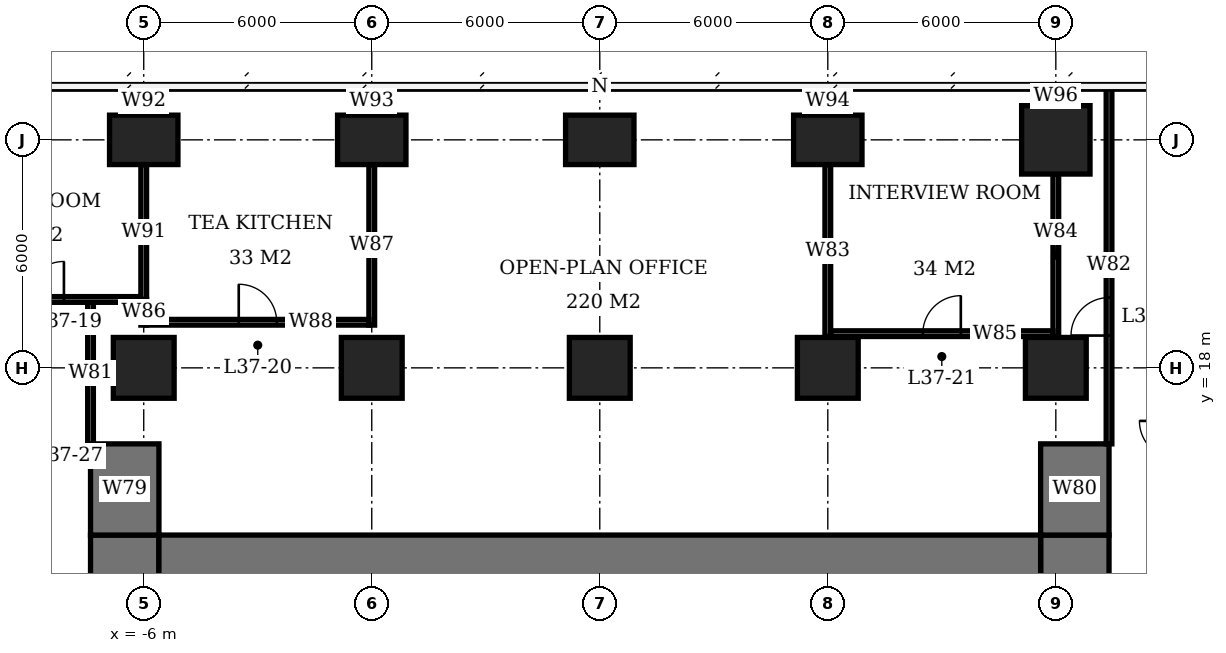
"""IFC4 building model, lengths in metres.
Left out: names, types, materials, properties, quantities, classifications, styles, units other than length and angle.
Written with IfcOpenShell. Run it as: python <this file> out.ifc"""

import sys

from ifc_helpers import new_model, si_unit, direction, frame, frame_2d, origin, origin_2d, place, context, subcontext, project, spatial, rectangle, extrude, element, fill, save


model = new_model("IFC4")
c1 = context("Model", 3, precision=1e-05, world=origin(), true_north=direction((0.0, 1.0)))
c2 = subcontext(c1, "Body", "Model", "MODEL_VIEW")
j1 = project(units=[si_unit("LENGTHUNIT", "METRE"), si_unit("PLANEANGLEUNIT", "RADIAN")], contexts=[c1])
p1 = place(None, origin())
s1 = spatial("IfcSite", under=j1, at=p1, CompositionType="ELEMENT")
p2 = place(p1, origin())
s2 = spatial("IfcBuilding", under=s1, at=p2, CompositionType="ELEMENT")
p3 = place(p2, frame((0.0, 0.0, 152.3)))
s3 = spatial("IfcBuildingStorey", under=s2, at=p3, CompositionType="ELEMENT", Elevation=152.3)
p4 = place(p3, frame((-6.0, 18.0, 0.0), z_axis=(0.0, 0.0, 1.0), x_axis=(1.0, 0.0, 0.0)))
e1 = element("IfcColumn", 1, at=p4, inside=s3, PredefinedType="COLUMN", context=c2, shape_type="SweptSolid", body=[
    extrude(rectangle(XDim=1.6, YDim=1.6, at=origin_2d()), origin(), (0.0, 0.0, 1.0), 3.9),
])
p5 = place(p3, frame((-6.0, 24.0, 0.0), z_axis=(0.0, 0.0, 1.0), x_axis=(1.0, 0.0, 0.0)))
e2 = element("IfcColumn", 2, at=p5, inside=s3, PredefinedType="COLUMN", context=c2, shape_type="SweptSolid", body=[
    extrude(rectangle(XDim=1.8, YDim=1.3, at=origin_2d()), origin(), (0.0, 0.0, 1.0), 3.9),
])
p6 = place(p3, frame((0.0, 18.0, 0.0), z_axis=(0.0, 0.0, 1.0), x_axis=(1.0, 0.0, 0.0)))
e3 = element("IfcColumn", 3, at=p6, inside=s3, PredefinedType="COLUMN", context=c2, shape_type="SweptSolid", body=[
    extrude(rectangle(XDim=1.6, YDim=1.6, at=origin_2d()), origin(), (0.0, 0.0, 1.0), 3.9),
])
p7 = place(p3, frame((0.0, 24.0, 0.0), z_axis=(0.0, 0.0, 1.0), x_axis=(1.0, 0.0, 0.0)))
e4 = element("IfcColumn", 4, at=p7, inside=s3, PredefinedType="COLUMN", context=c2, shape_type="SweptSolid", body=[
    extrude(rectangle(XDim=1.8, YDim=1.3, at=origin_2d()), origin(), (0.0, 0.0, 1.0), 3.9),
])
p8 = place(p3, frame((6.0, 18.0, 0.0), z_axis=(0.0, 0.0, 1.0), x_axis=(1.0, 0.0, 0.0)))
e5 = element("IfcColumn", 5, at=p8, inside=s3, PredefinedType="COLUMN", context=c2, shape_type="SweptSolid", body=[
    extrude(rectangle(XDim=1.6, YDim=1.6, at=origin_2d()), origin(), (0.0, 0.0, 1.0), 3.9),
])
p9 = place(p3, frame((6.0, 24.0, 0.0), z_axis=(0.0, 0.0, 1.0), x_axis=(1.0, 0.0, 0.0)))
e6 = element("IfcColumn", 6, at=p9, inside=s3, PredefinedType="COLUMN", context=c2, shape_type="SweptSolid", body=[
    extrude(rectangle(XDim=1.8, YDim=1.3, at=origin_2d()), origin(), (0.0, 0.0, 1.0), 3.9),
])
p10 = place(p3, frame((12.0, 18.0, 0.0), z_axis=(0.0, 0.0, 1.0), x_axis=(1.0, 0.0, 0.0)))
e7 = element("IfcColumn", 7, at=p10, inside=s3, PredefinedType="COLUMN", context=c2, shape_type="SweptSolid", body=[
    extrude(rectangle(XDim=1.6, YDim=1.6, at=origin_2d()), origin(), (0.0, 0.0, 1.0), 3.9),
])
p11 = place(p3, frame((12.0, 24.0, 0.0), z_axis=(0.0, 0.0, 1.0), x_axis=(1.0, 0.0, 0.0)))
e8 = element("IfcColumn", 8, at=p11, inside=s3, PredefinedType="COLUMN", context=c2, shape_type="SweptSolid", body=[
    extrude(rectangle(XDim=1.8, YDim=1.3, at=origin_2d()), origin(), (0.0, 0.0, 1.0), 3.9),
])
p12 = place(p3, frame((18.0, 18.0, 0.0), z_axis=(0.0, 0.0, 1.0), x_axis=(1.0, 0.0, 0.0)))
e9 = element("IfcColumn", 9, at=p12, inside=s3, PredefinedType="COLUMN", context=c2, shape_type="SweptSolid", body=[
    extrude(rectangle(XDim=1.6, YDim=1.6, at=origin_2d()), origin(), (0.0, 0.0, 1.0), 3.9),
])
p13 = place(p3, frame((18.0, 24.0, 0.0), z_axis=(0.0, 0.0, 1.0), x_axis=(1.0, 0.0, 0.0)))
e10 = element("IfcColumn", 10, at=p13, inside=s3, PredefinedType="COLUMN", context=c2, shape_type="SweptSolid", body=[
    extrude(rectangle(XDim=1.8, YDim=1.8, at=origin_2d()), origin(), (0.0, 0.0, 1.0), 3.9),
])
p14 = place(p3, frame((-5.6, 12.6, 0.0), z_axis=(0.0, 0.0, 1.0), x_axis=(1.0, 0.0, 0.0)))
e11 = element("IfcWall", 11, at=p14, inside=s3, PredefinedType="SHEAR", context=c2, shape_type="SweptSolid", body=[
    extrude(rectangle(XDim=23.2, YDim=2.0, at=frame_2d((11.6, 0.0))), origin(), (0.0, 0.0, 1.0), 3.9),
])
p15 = place(p3, frame((-6.5, -7.6, 0.0), z_axis=(0.0, 0.0, 1.0), x_axis=(0.0, 1.0, 0.0)))
e12 = element("IfcWall", 12, at=p15, inside=s3, PredefinedType="SHEAR", context=c2, shape_type="SweptSolid", body=[
    extrude(rectangle(XDim=21.2, YDim=1.8, at=frame_2d((10.6, 0.0))), origin(), (0.0, 0.0, 1.0), 3.9),
])
p16 = place(p15, frame((7.8, 0.0, 0.0)))
e13 = element("IfcOpeningElement", 13, at=p16, cuts=e12, PredefinedType="OPENING", context=c2, shape_type="SweptSolid", body=[
    extrude(rectangle(XDim=1.8, YDim=2.4, at=frame_2d((0.9, 1.2))), frame((0.0, 0.91, 0.0), z_axis=(0.0, -1.0, 0.0), x_axis=(1.0, 0.0, 0.0)), (0.0, 0.0, 1.0), 1.82),
])
p17 = place(p3, frame((18.5, -7.6, 0.0), z_axis=(0.0, 0.0, 1.0), x_axis=(0.0, 1.0, 0.0)))
e14 = element("IfcWall", 14, at=p17, inside=s3, PredefinedType="SHEAR", context=c2, shape_type="SweptSolid", body=[
    extrude(rectangle(XDim=21.2, YDim=1.8, at=frame_2d((10.6, 0.0))), origin(), (0.0, 0.0, 1.0), 3.9),
])
p18 = place(p17, frame((9.2, 0.0, 0.0)))
e15 = element("IfcOpeningElement", 15, at=p18, cuts=e14, PredefinedType="OPENING", context=c2, shape_type="SweptSolid", body=[
    extrude(rectangle(XDim=1.8, YDim=2.4, at=frame_2d((0.9, 1.2))), frame((0.0, 0.91, 0.0), z_axis=(0.0, -1.0, 0.0), x_axis=(1.0, 0.0, 0.0)), (0.0, 0.0, 1.0), 1.82),
])
for number, where, z_axis, x_axis in (
    (16, (-6.5, 13.6, 0.0), (0.0, 0.0, 1.0), (0.0, 1.0, 0.0)),
    (17, (18.5, 13.6, 0.0), (0.0, 0.0, 1.0), (0.0, 1.0, 0.0)),
):
    element("IfcWall", number, at=place(p3, frame(where, z_axis=z_axis, x_axis=x_axis)), inside=s3, PredefinedType="SHEAR", context=c2, shape_type="SweptSolid", body=[
        extrude(rectangle(XDim=2.4, YDim=1.8, at=frame_2d((1.2, 0.0))), origin(), (0.0, 0.0, 1.0), 3.9),
    ])
p19 = place(p3, frame((12.075, 18.9, 0.0), z_axis=(0.0, 0.0, 1.0), x_axis=(1.0, 0.0, 0.0)))
e18 = element("IfcWall", 18, at=p19, inside=s3, PredefinedType="PARTITIONING", context=c2, shape_type="SweptSolid", body=[
    extrude(rectangle(XDim=5.85, YDim=0.15, at=frame_2d((2.925, 0.0))), origin(), (0.0, 0.0, 1.0), 3.65),
])
p20 = place(p19, frame((2.425, 0.0, 0.0)))
e19 = element("IfcOpeningElement", 19, at=p20, cuts=e18, PredefinedType="OPENING", context=c2, shape_type="SweptSolid", body=[
    extrude(rectangle(XDim=1.0, YDim=2.1, at=frame_2d((0.5, 1.05))), frame((0.0, 0.085, 0.0), z_axis=(0.0, -1.0, 0.0), x_axis=(1.0, 0.0, 0.0)), (0.0, 0.0, 1.0), 0.17),
])
p21 = place(p3, frame((-5.925, 19.2, 0.0), z_axis=(0.0, 0.0, 1.0), x_axis=(1.0, 0.0, 0.0)))
e20 = element("IfcWall", 20, at=p21, inside=s3, PredefinedType="PARTITIONING", context=c2, shape_type="SweptSolid", body=[
    extrude(rectangle(XDim=5.85, YDim=0.15, at=frame_2d((2.925, 0.0))), origin(), (0.0, 0.0, 1.0), 3.65),
])
p22 = place(p21, frame((2.425, 0.0, 0.0)))
e21 = element("IfcOpeningElement", 21, at=p22, cuts=e20, PredefinedType="OPENING", context=c2, shape_type="SweptSolid", body=[
    extrude(rectangle(XDim=1.0, YDim=2.1, at=frame_2d((0.5, 1.05))), frame((0.0, 0.085, 0.0), z_axis=(0.0, -1.0, 0.0), x_axis=(1.0, 0.0, 0.0)), (0.0, 0.0, 1.0), 0.17),
])
p23 = place(p3, frame((-11.925, 19.8, 0.0), z_axis=(0.0, 0.0, 1.0), x_axis=(1.0, 0.0, 0.0)))
e22 = element("IfcWall", 22, at=p23, inside=s3, PredefinedType="PARTITIONING", context=c2, shape_type="SweptSolid", body=[
    extrude(rectangle(XDim=5.85, YDim=0.15, at=frame_2d((2.925, 0.0))), origin(), (0.0, 0.0, 1.0), 3.65),
])
p24 = place(p23, frame((2.825, 0.0, 0.0)))
e23 = element("IfcOpeningElement", 23, at=p24, cuts=e22, PredefinedType="OPENING", context=c2, shape_type="SweptSolid", body=[
    extrude(rectangle(XDim=1.0, YDim=2.1, at=frame_2d((0.5, 1.05))), frame((0.0, 0.085, 0.0), z_axis=(0.0, -1.0, 0.0), x_axis=(1.0, 0.0, 0.0)), (0.0, 0.0, 1.0), 0.17),
])
p25 = place(p3, frame((-6.0, 19.125, 0.0), z_axis=(0.0, 0.0, 1.0), x_axis=(0.0, 1.0, 0.0)))
e24 = element("IfcWall", 24, at=p25, inside=s3, PredefinedType="PARTITIONING", context=c2, shape_type="SweptSolid", body=[
    extrude(rectangle(XDim=0.675, YDim=0.15, at=frame_2d((0.337, 0.0))), origin(), (0.0, 0.0, 1.0), 3.65),
])
p26 = place(p3, frame((-6.0, 19.8, 0.0), z_axis=(0.0, 0.0, 1.0), x_axis=(0.0, 1.0, 0.0)))
e25 = element("IfcWall", 25, at=p26, inside=s3, PredefinedType="PARTITIONING", context=c2, shape_type="SweptSolid", body=[
    extrude(rectangle(XDim=3.55, YDim=0.15, at=frame_2d((1.775, 0.0))), origin(), (0.0, 0.0, 1.0), 3.65),
])
p27 = place(p3, frame((-6.0, 24.65, 0.0), z_axis=(0.0, 0.0, 1.0), x_axis=(0.0, 1.0, 0.0)))
e26 = element("IfcWall", 26, at=p27, inside=s3, PredefinedType="PARTITIONING", context=c2, shape_type="SweptSolid", body=[
    extrude(rectangle(XDim=0.75, YDim=0.15, at=frame_2d((0.375, 0.0))), origin(), (0.0, 0.0, 1.0), 3.65),
])
p28 = place(p3, frame((0.0, 19.125, 0.0), z_axis=(0.0, 0.0, 1.0), x_axis=(0.0, 1.0, 0.0)))
e27 = element("IfcWall", 27, at=p28, inside=s3, PredefinedType="PARTITIONING", context=c2, shape_type="SweptSolid", body=[
    extrude(rectangle(XDim=4.225, YDim=0.15, at=frame_2d((2.113, 0.0))), origin(), (0.0, 0.0, 1.0), 3.65),
])
p29 = place(p3, frame((0.0, 24.65, 0.0), z_axis=(0.0, 0.0, 1.0), x_axis=(0.0, 1.0, 0.0)))
e28 = element("IfcWall", 28, at=p29, inside=s3, PredefinedType="PARTITIONING", context=c2, shape_type="SweptSolid", body=[
    extrude(rectangle(XDim=0.75, YDim=0.15, at=frame_2d((0.375, 0.0))), origin(), (0.0, 0.0, 1.0), 3.65),
])
p30 = place(p3, frame((12.0, 18.825, 0.0), z_axis=(0.0, 0.0, 1.0), x_axis=(0.0, 1.0, 0.0)))
e29 = element("IfcWall", 29, at=p30, inside=s3, PredefinedType="PARTITIONING", context=c2, shape_type="SweptSolid", body=[
    extrude(rectangle(XDim=4.525, YDim=0.15, at=frame_2d((2.263, 0.0))), origin(), (0.0, 0.0, 1.0), 3.65),
])
p31 = place(p3, frame((12.0, 24.65, 0.0), z_axis=(0.0, 0.0, 1.0), x_axis=(0.0, 1.0, 0.0)))
e30 = element("IfcWall", 30, at=p31, inside=s3, PredefinedType="PARTITIONING", context=c2, shape_type="SweptSolid", body=[
    extrude(rectangle(XDim=0.75, YDim=0.15, at=frame_2d((0.375, 0.0))), origin(), (0.0, 0.0, 1.0), 3.65),
])
p32 = place(p3, frame((18.0, 18.825, 0.0), z_axis=(0.0, 0.0, 1.0), x_axis=(0.0, 1.0, 0.0)))
e31 = element("IfcWall", 31, at=p32, inside=s3, PredefinedType="PARTITIONING", context=c2, shape_type="SweptSolid", body=[
    extrude(rectangle(XDim=4.275, YDim=0.15, at=frame_2d((2.138, 0.0))), origin(), (0.0, 0.0, 1.0), 3.65),
])
p33 = place(p3, frame((18.0, 24.9, 0.0), z_axis=(0.0, 0.0, 1.0), x_axis=(0.0, 1.0, 0.0)))
e32 = element("IfcWall", 32, at=p33, inside=s3, PredefinedType="PARTITIONING", context=c2, shape_type="SweptSolid", body=[
    extrude(rectangle(XDim=0.5, YDim=0.15, at=frame_2d((0.25, 0.0))), origin(), (0.0, 0.0, 1.0), 3.65),
])
p34 = place(p3, frame((-7.4, 16.0, 0.0), z_axis=(0.0, 0.0, 1.0), x_axis=(0.0, 1.0, 0.0)))
e33 = element("IfcWall", 33, at=p34, inside=s3, PredefinedType="PARTITIONING", context=c2, shape_type="SweptSolid", body=[
    extrude(rectangle(XDim=3.725, YDim=0.15, at=frame_2d((1.863, 0.0))), origin(), (0.0, 0.0, 1.0), 3.65),
])
p35 = place(p3, frame((19.4, 16.0, 0.0), z_axis=(0.0, 0.0, 1.0), x_axis=(0.0, 1.0, 0.0)))
e34 = element("IfcWall", 34, at=p35, inside=s3, PredefinedType="PARTITIONING", context=c2, shape_type="SweptSolid", body=[
    extrude(rectangle(XDim=9.4, YDim=0.15, at=frame_2d((4.7, 0.0))), origin(), (0.0, 0.0, 1.0), 3.65),
])
p36 = place(p35, frame((2.85, 0.0, 0.0)))
e35 = element("IfcOpeningElement", 35, at=p36, cuts=e34, PredefinedType="OPENING", context=c2, shape_type="SweptSolid", body=[
    extrude(rectangle(XDim=1.0, YDim=2.1, at=frame_2d((0.5, 1.05))), frame((0.0, 0.085, 0.0), z_axis=(0.0, -1.0, 0.0), x_axis=(1.0, 0.0, 0.0)), (0.0, 0.0, 1.0), 0.17),
])
p37 = place(p24, origin())
e36 = element("IfcDoor", 36, at=p37, inside=s3, OperationType="SINGLE_SWING_RIGHT", PredefinedType="DOOR", context=c2, shape_type="SweptSolid", body=[
    extrude(rectangle(XDim=1.0, YDim=2.1, at=frame_2d((0.5, 1.05))), frame((0.0, 0.025, 0.0), z_axis=(0.0, -1.0, 0.0), x_axis=(1.0, 0.0, 0.0)), (0.0, 0.0, 1.0), 0.05),
])
fill(e23, e36)
p38 = place(p22, origin())
e37 = element("IfcDoor", 37, at=p38, inside=s3, OperationType="SINGLE_SWING_LEFT", PredefinedType="DOOR", context=c2, shape_type="SweptSolid", body=[
    extrude(rectangle(XDim=1.0, YDim=2.1, at=frame_2d((0.5, 1.05))), frame((0.0, 0.025, 0.0), z_axis=(0.0, -1.0, 0.0), x_axis=(1.0, 0.0, 0.0)), (0.0, 0.0, 1.0), 0.05),
])
fill(e21, e37)
p39 = place(p20, origin())
e38 = element("IfcDoor", 38, at=p39, inside=s3, OperationType="SINGLE_SWING_RIGHT", PredefinedType="DOOR", context=c2, shape_type="SweptSolid", body=[
    extrude(rectangle(XDim=1.0, YDim=2.1, at=frame_2d((0.5, 1.05))), frame((0.0, 0.025, 0.0), z_axis=(0.0, -1.0, 0.0), x_axis=(1.0, 0.0, 0.0)), (0.0, 0.0, 1.0), 0.05),
])
fill(e19, e38)
p40 = place(p36, origin())
e39 = element("IfcDoor", 39, at=p40, inside=s3, OperationType="SINGLE_SWING_LEFT", PredefinedType="DOOR", context=c2, shape_type="SweptSolid", body=[
    extrude(rectangle(XDim=1.0, YDim=2.1, at=frame_2d((0.5, 1.05))), frame((0.0, 0.025, 0.0), z_axis=(0.0, -1.0, 0.0), x_axis=(1.0, 0.0, 0.0)), (0.0, 0.0, 1.0), 0.05),
])
fill(e35, e39)
save(model, sys.argv[1])
